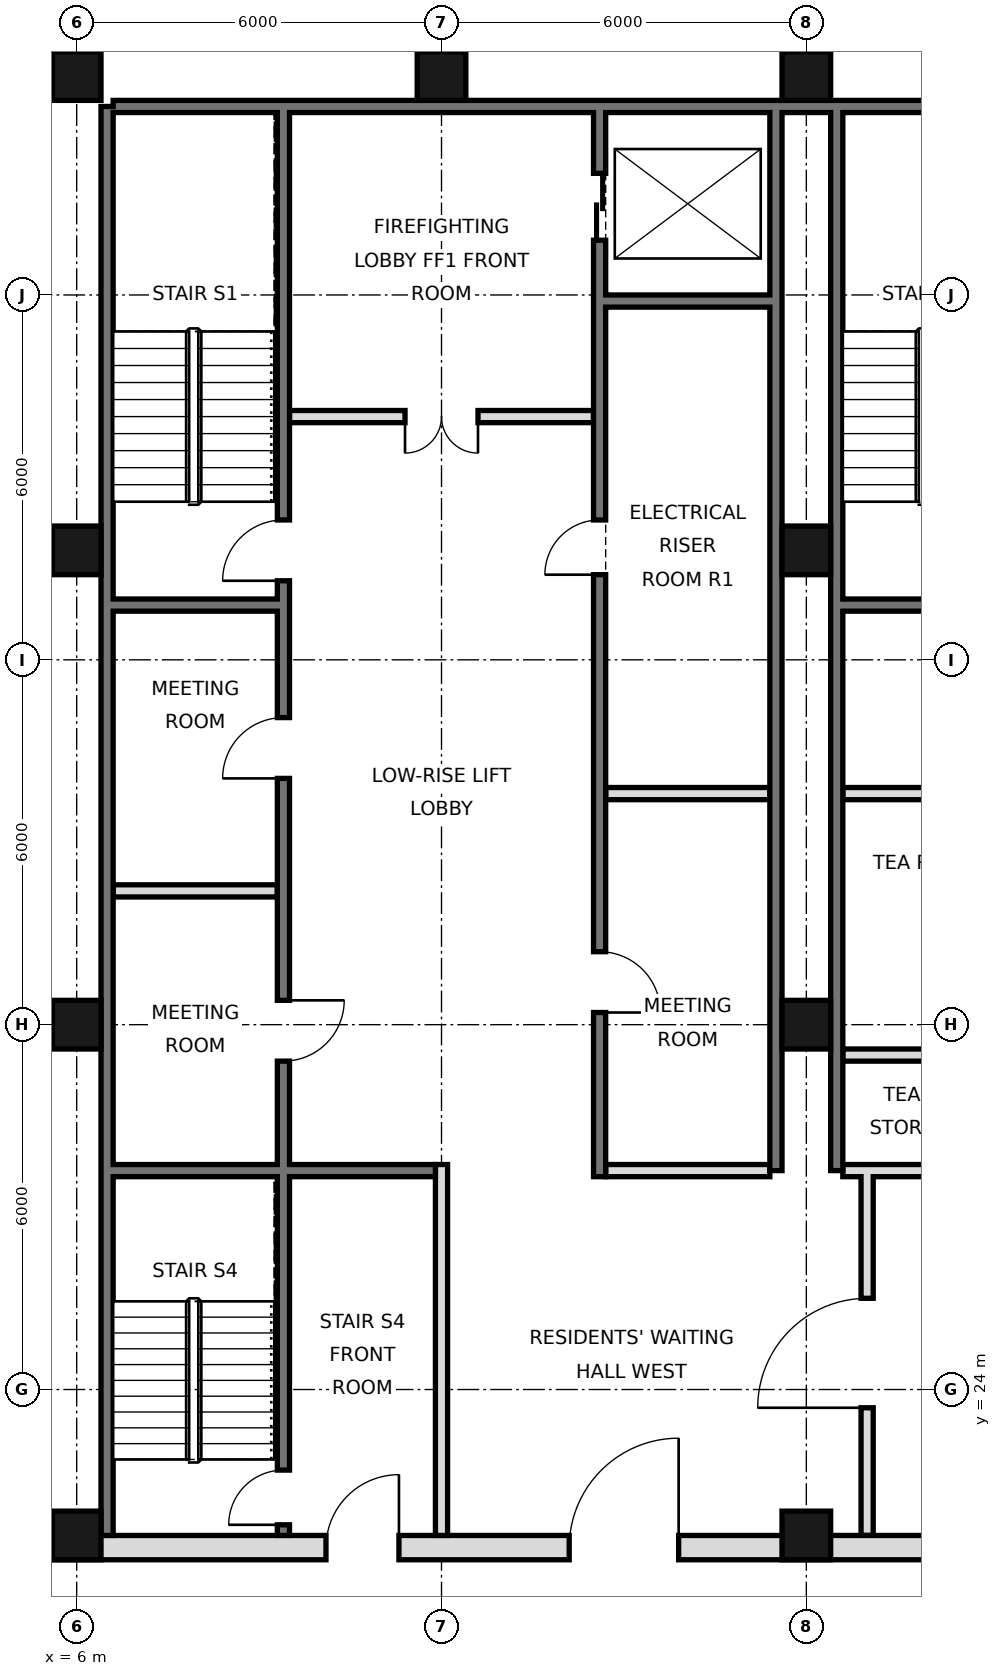
"""IFC4 building model, lengths in metres.
Left out: names, types, materials, properties, quantities, classifications, styles, units other than length and angle.
Written with IfcOpenShell. Run it as: python <this file> out.ifc"""

import sys

from ifc_helpers import new_model, si_unit, direction, frame, frame_2d, origin, origin_2d, place, context, subcontext, project, spatial, rectangle, hollow_rectangle, extrude, element, fill, save


model = new_model("IFC4")
c1 = context("Model", 3, precision=1e-05, world=origin(), true_north=direction((0.0, 1.0)))
c2 = subcontext(c1, "Body", "Model", "MODEL_VIEW")
j1 = project(units=[si_unit("LENGTHUNIT", "METRE"), si_unit("PLANEANGLEUNIT", "RADIAN")], contexts=[c1])
p1 = place(None, origin())
s1 = spatial("IfcSite", under=j1, at=p1, CompositionType="ELEMENT")
p2 = place(p1, origin())
s2 = spatial("IfcBuilding", under=s1, at=p2, CompositionType="ELEMENT")
p3 = place(p2, frame((0.0, 0.0, 270.2)))
s3 = spatial("IfcBuildingStorey", under=s2, at=p3, CompositionType="ELEMENT", Elevation=270.2)
for number, where, z_axis, x_axis in (
    (1, (6.0, 21.6, 0.0), (0.0, 0.0, 1.0), (1.0, 0.0, 0.0)),
    (2, (6.0, 30.0, 0.0), (0.0, 0.0, 1.0), (1.0, 0.0, 0.0)),
    (3, (6.0, 37.8, 0.0), (0.0, 0.0, 1.0), (1.0, 0.0, 0.0)),
    (4, (6.0, 45.6, 0.0), (0.0, 0.0, 1.0), (1.0, 0.0, 0.0)),
    (5, (12.0, 45.6, 0.0), (0.0, 0.0, 1.0), (1.0, 0.0, 0.0)),
    (6, (18.0, 21.6, 0.0), (0.0, 0.0, 1.0), (1.0, 0.0, 0.0)),
    (7, (18.0, 30.0, 0.0), (0.0, 0.0, 1.0), (1.0, 0.0, 0.0)),
    (8, (18.0, 37.8, 0.0), (0.0, 0.0, 1.0), (1.0, 0.0, 0.0)),
    (9, (18.0, 45.6, 0.0), (0.0, 0.0, 1.0), (1.0, 0.0, 0.0)),
):
    element("IfcColumn", number, at=place(p3, frame(where, z_axis=z_axis, x_axis=x_axis)), inside=s3, PredefinedType="COLUMN", context=c2, shape_type="SweptSolid", body=[
        extrude(hollow_rectangle(XDim=0.8, YDim=0.8, WallThickness=0.032, at=origin_2d()), origin(), (0.0, 0.0, 1.0), 3.6),
    ])
p4 = place(p3, frame((6.5, 21.6, 0.0), z_axis=(0.0, 0.0, 1.0), x_axis=(0.0, 1.0, 0.0)))
e10 = element("IfcWall", 10, at=p4, inside=s3, PredefinedType="SOLIDWALL", context=c2, shape_type="SweptSolid", body=[
    extrude(rectangle(XDim=23.5, YDim=0.2, at=frame_2d((11.75, 0.0))), origin(), (0.0, 0.0, 1.0), 3.42),
])
p5 = place(p3, frame((6.6, 45.1, 0.0), z_axis=(0.0, 0.0, 1.0), x_axis=(1.0, 0.0, 0.0)))
e11 = element("IfcWall", 11, at=p5, inside=s3, PredefinedType="SOLIDWALL", context=c2, shape_type="SweptSolid", body=[
    extrude(rectangle(XDim=34.8, YDim=0.2, at=frame_2d((17.4, 0.0))), origin(), (0.0, 0.0, 1.0), 3.42),
])
for number, where, z_axis, x_axis in (
    (12, (17.5, 27.6, 0.0), (0.0, 0.0, 1.0), (0.0, 1.0, 0.0)),
    (13, (18.5, 27.6, 0.0), (0.0, 0.0, 1.0), (0.0, 1.0, 0.0)),
):
    element("IfcWall", number, at=place(p3, frame(where, z_axis=z_axis, x_axis=x_axis)), inside=s3, PredefinedType="SOLIDWALL", context=c2, shape_type="SweptSolid", body=[
        extrude(rectangle(XDim=17.5, YDim=0.2, at=frame_2d((8.75, 0.0))), origin(), (0.0, 0.0, 1.0), 3.42),
    ])
p6 = place(p3, frame((5.6, 21.4, 0.0), z_axis=(0.0, 0.0, 1.0), x_axis=(1.0, 0.0, 0.0)))
e14 = element("IfcWall", 14, at=p6, inside=s3, PredefinedType="SOLIDWALL", context=c2, shape_type="SweptSolid", body=[
    extrude(rectangle(XDim=36.8, YDim=0.4, at=frame_2d((18.4, 0.0))), origin(), (0.0, 0.0, 1.0), 3.42),
])
p7 = place(p6, frame((8.5, 0.0, 0.0)))
e15 = element("IfcOpeningElement", 15, at=p7, cuts=e14, PredefinedType="OPENING", context=c2, shape_type="SweptSolid", body=[
    extrude(rectangle(XDim=1.8, YDim=2.1, at=frame_2d((0.9, 1.05))), frame((0.0, 0.21, 0.0), z_axis=(0.0, -1.0, 0.0), x_axis=(1.0, 0.0, 0.0)), (0.0, 0.0, 1.0), 0.42),
])
p8 = place(p6, frame((17.5, 0.0, 0.0)))
e16 = element("IfcOpeningElement", 16, at=p8, cuts=e14, PredefinedType="OPENING", context=c2, shape_type="SweptSolid", body=[
    extrude(rectangle(XDim=1.8, YDim=2.1, at=frame_2d((0.9, 1.05))), frame((0.0, 0.21, 0.0), z_axis=(0.0, -1.0, 0.0), x_axis=(1.0, 0.0, 0.0)), (0.0, 0.0, 1.0), 0.42),
])
p9 = place(p6, frame((26.5, 0.0, 0.0)))
e17 = element("IfcOpeningElement", 17, at=p9, cuts=e14, PredefinedType="OPENING", context=c2, shape_type="SweptSolid", body=[
    extrude(rectangle(XDim=1.8, YDim=2.1, at=frame_2d((0.9, 1.05))), frame((0.0, 0.21, 0.0), z_axis=(0.0, -1.0, 0.0), x_axis=(1.0, 0.0, 0.0)), (0.0, 0.0, 1.0), 0.42),
])
p10 = place(p6, frame((4.5, 0.0, 0.0)))
e18 = element("IfcOpeningElement", 18, at=p10, cuts=e14, PredefinedType="OPENING", context=c2, shape_type="SweptSolid", body=[
    extrude(rectangle(XDim=1.2, YDim=2.1, at=frame_2d((0.6, 1.05))), frame((0.0, 0.21, 0.0), z_axis=(0.0, -1.0, 0.0), x_axis=(1.0, 0.0, 0.0)), (0.0, 0.0, 1.0), 0.42),
])
p11 = place(p6, frame((31.1, 0.0, 0.0)))
e19 = element("IfcOpeningElement", 19, at=p11, cuts=e14, PredefinedType="OPENING", context=c2, shape_type="SweptSolid", body=[
    extrude(rectangle(XDim=1.2, YDim=2.1, at=frame_2d((0.6, 1.05))), frame((0.0, 0.21, 0.0), z_axis=(0.0, -1.0, 0.0), x_axis=(1.0, 0.0, 0.0)), (0.0, 0.0, 1.0), 0.42),
])
p12 = place(p3, frame((19.0, 21.6, 0.0), z_axis=(0.0, 0.0, 1.0), x_axis=(0.0, 1.0, 0.0)))
e20 = element("IfcWall", 20, at=p12, inside=s3, PredefinedType="PARTITIONING", context=c2, shape_type="SweptSolid", body=[
    extrude(rectangle(XDim=6.0, YDim=0.2, at=frame_2d((3.0, 0.0))), origin(), (0.0, 0.0, 1.0), 3.42),
])
p13 = place(p12, frame((2.1, 0.0, 0.0)))
e21 = element("IfcOpeningElement", 21, at=p13, cuts=e20, PredefinedType="OPENING", context=c2, shape_type="SweptSolid", body=[
    extrude(rectangle(XDim=1.8, YDim=2.1, at=frame_2d((0.9, 1.05))), frame((0.0, 0.11, 0.0), z_axis=(0.0, -1.0, 0.0), x_axis=(1.0, 0.0, 0.0)), (0.0, 0.0, 1.0), 0.22),
])
p14 = place(p3, frame((12.0, 21.6, 0.0), z_axis=(0.0, 0.0, 1.0), x_axis=(0.0, 1.0, 0.0)))
e22 = element("IfcWall", 22, at=p14, inside=s3, PredefinedType="PARTITIONING", context=c2, shape_type="SweptSolid", body=[
    extrude(rectangle(XDim=6.1, YDim=0.2, at=frame_2d((3.05, 0.0))), origin(), (0.0, 0.0, 1.0), 3.42),
])
p15 = place(p3, frame((14.6, 27.5, 0.0), z_axis=(0.0, 0.0, 1.0), x_axis=(0.0, 1.0, 0.0)))
e23 = element("IfcWall", 23, at=p15, inside=s3, PredefinedType="SOLIDWALL", context=c2, shape_type="SweptSolid", body=[
    extrude(rectangle(XDim=17.5, YDim=0.2, at=frame_2d((8.75, 0.0))), origin(), (0.0, 0.0, 1.0), 3.42),
])
p16 = place(p15, frame((15.4, 0.0, 0.0)))
e24 = element("IfcOpeningElement", 24, at=p16, cuts=e23, PredefinedType="OPENING", context=c2, shape_type="SweptSolid", body=[
    extrude(rectangle(XDim=1.1, YDim=2.1, at=frame_2d((0.55, 1.05))), frame((0.0, 0.11, 0.0), z_axis=(0.0, -1.0, 0.0), x_axis=(1.0, 0.0, 0.0)), (0.0, 0.0, 1.0), 0.22),
])
p17 = place(p15, frame((2.7, 0.0, 0.0)))
e25 = element("IfcOpeningElement", 25, at=p17, cuts=e23, PredefinedType="OPENING", context=c2, shape_type="SweptSolid", body=[
    extrude(rectangle(XDim=1.0, YDim=2.1, at=frame_2d((0.5, 1.05))), frame((0.0, 0.11, 0.0), z_axis=(0.0, -1.0, 0.0), x_axis=(1.0, 0.0, 0.0)), (0.0, 0.0, 1.0), 0.22),
])
p18 = place(p15, frame((9.9, 0.0, 0.0)))
e26 = element("IfcOpeningElement", 26, at=p18, cuts=e23, PredefinedType="OPENING", context=c2, shape_type="SweptSolid", body=[
    extrude(rectangle(XDim=0.9, YDim=2.1, at=frame_2d((0.45, 1.05))), frame((0.0, 0.11, 0.0), z_axis=(0.0, -1.0, 0.0), x_axis=(1.0, 0.0, 0.0)), (0.0, 0.0, 1.0), 0.22),
])
p19 = place(p3, frame((9.4, 21.6, 0.0), z_axis=(0.0, 0.0, 1.0), x_axis=(0.0, 1.0, 0.0)))
e27 = element("IfcWall", 27, at=p19, inside=s3, PredefinedType="SOLIDWALL", context=c2, shape_type="SweptSolid", body=[
    extrude(rectangle(XDim=23.4, YDim=0.2, at=frame_2d((11.7, 0.0))), origin(), (0.0, 0.0, 1.0), 3.42),
])
p20 = place(p19, frame((7.8, 0.0, 0.0)))
e28 = element("IfcOpeningElement", 28, at=p20, cuts=e27, PredefinedType="OPENING", context=c2, shape_type="SweptSolid", body=[
    extrude(rectangle(XDim=1.0, YDim=2.1, at=frame_2d((0.5, 1.05))), frame((0.0, 0.11, 0.0), z_axis=(0.0, -1.0, 0.0), x_axis=(1.0, 0.0, 0.0)), (0.0, 0.0, 1.0), 0.22),
])
p21 = place(p19, frame((12.45, 0.0, 0.0)))
e29 = element("IfcOpeningElement", 29, at=p21, cuts=e27, PredefinedType="OPENING", context=c2, shape_type="SweptSolid", body=[
    extrude(rectangle(XDim=1.0, YDim=2.1, at=frame_2d((0.5, 1.05))), frame((0.0, 0.11, 0.0), z_axis=(0.0, -1.0, 0.0), x_axis=(1.0, 0.0, 0.0)), (0.0, 0.0, 1.0), 0.22),
])
p22 = place(p19, frame((15.7, 0.0, 0.0)))
e30 = element("IfcOpeningElement", 30, at=p22, cuts=e27, PredefinedType="OPENING", context=c2, shape_type="SweptSolid", body=[
    extrude(rectangle(XDim=1.0, YDim=2.1, at=frame_2d((0.5, 1.05))), frame((0.0, 0.11, 0.0), z_axis=(0.0, -1.0, 0.0), x_axis=(1.0, 0.0, 0.0)), (0.0, 0.0, 1.0), 0.22),
])
p23 = place(p19, frame((0.175, 0.0, 0.0)))
e31 = element("IfcOpeningElement", 31, at=p23, cuts=e27, PredefinedType="OPENING", context=c2, shape_type="SweptSolid", body=[
    extrude(rectangle(XDim=0.9, YDim=2.1, at=frame_2d((0.45, 1.05))), frame((0.0, 0.11, 0.0), z_axis=(0.0, -1.0, 0.0), x_axis=(1.0, 0.0, 0.0)), (0.0, 0.0, 1.0), 0.22),
])
for number, where, z_axis, x_axis in (
    (32, (14.7, 27.6, 0.0), (0.0, 0.0, 1.0), (1.0, 0.0, 0.0)),
    (33, (18.6, 27.6, 0.0), (0.0, 0.0, 1.0), (1.0, 0.0, 0.0)),
):
    element("IfcWall", number, at=place(p3, frame(where, z_axis=z_axis, x_axis=x_axis)), inside=s3, PredefinedType="PARTITIONING", context=c2, shape_type="SweptSolid", body=[
        extrude(rectangle(XDim=2.7, YDim=0.2, at=frame_2d((1.35, 0.0))), origin(), (0.0, 0.0, 1.0), 3.42),
    ])
p24 = place(p3, frame((6.6, 27.6, 0.0), z_axis=(0.0, 0.0, 1.0), x_axis=(1.0, 0.0, 0.0)))
e34 = element("IfcWall", 34, at=p24, inside=s3, PredefinedType="SOLIDWALL", context=c2, shape_type="SweptSolid", body=[
    extrude(rectangle(XDim=5.3, YDim=0.2, at=frame_2d((2.65, 0.0))), origin(), (0.0, 0.0, 1.0), 3.42),
])
for number, where, z_axis, x_axis in (
    (35, (18.6, 29.5, 0.0), (0.0, 0.0, 1.0), (1.0, 0.0, 0.0)),
    (36, (6.6, 32.2, 0.0), (0.0, 0.0, 1.0), (1.0, 0.0, 0.0)),
):
    element("IfcWall", number, at=place(p3, frame(where, z_axis=z_axis, x_axis=x_axis)), inside=s3, PredefinedType="PARTITIONING", context=c2, shape_type="SweptSolid", body=[
        extrude(rectangle(XDim=2.7, YDim=0.2, at=frame_2d((1.35, 0.0))), origin(), (0.0, 0.0, 1.0), 3.42),
    ])
for number, where, z_axis, x_axis in (
    (37, (14.7, 33.8, 0.0), (0.0, 0.0, 1.0), (1.0, 0.0, 0.0)),
    (38, (18.6, 33.8, 0.0), (0.0, 0.0, 1.0), (1.0, 0.0, 0.0)),
    (39, (18.6, 36.9, 0.0), (0.0, 0.0, 1.0), (1.0, 0.0, 0.0)),
    (40, (6.6, 36.9, 0.0), (0.0, 0.0, 1.0), (1.0, 0.0, 0.0)),
):
    element("IfcWall", number, at=place(p3, frame(where, z_axis=z_axis, x_axis=x_axis)), inside=s3, PredefinedType="SOLIDWALL", context=c2, shape_type="SweptSolid", body=[
        extrude(rectangle(XDim=2.7, YDim=0.2, at=frame_2d((1.35, 0.0))), origin(), (0.0, 0.0, 1.0), 3.42),
    ])
p25 = place(p3, frame((9.5, 40.0, 0.0), z_axis=(0.0, 0.0, 1.0), x_axis=(1.0, 0.0, 0.0)))
e41 = element("IfcWall", 41, at=p25, inside=s3, PredefinedType="PARTITIONING", context=c2, shape_type="SweptSolid", body=[
    extrude(rectangle(XDim=5.0, YDim=0.2, at=frame_2d((2.5, 0.0))), origin(), (0.0, 0.0, 1.0), 3.42),
])
p26 = place(p25, frame((1.9, 0.0, 0.0)))
e42 = element("IfcOpeningElement", 42, at=p26, cuts=e41, PredefinedType="OPENING", context=c2, shape_type="SweptSolid", body=[
    extrude(rectangle(XDim=1.2, YDim=2.1, at=frame_2d((0.6, 1.05))), frame((0.0, 0.11, 0.0), z_axis=(0.0, -1.0, 0.0), x_axis=(1.0, 0.0, 0.0)), (0.0, 0.0, 1.0), 0.22),
])
p27 = place(p3, frame((14.7, 41.9, 0.0), z_axis=(0.0, 0.0, 1.0), x_axis=(1.0, 0.0, 0.0)))
e43 = element("IfcWall", 43, at=p27, inside=s3, PredefinedType="SOLIDWALL", context=c2, shape_type="SweptSolid", body=[
    extrude(rectangle(XDim=2.7, YDim=0.2, at=frame_2d((1.35, 0.0))), origin(), (0.0, 0.0, 1.0), 3.42),
])
p28 = place(p7, frame((1.8, 0.0, 0.0), z_axis=(0.0, 0.0, 1.0), x_axis=(-1.0, 0.0, 0.0)))
e44 = element("IfcDoor", 44, at=p28, inside=s3, OperationType="SINGLE_SWING_LEFT", PredefinedType="DOOR", context=c2, shape_type="SweptSolid", body=[
    extrude(rectangle(XDim=1.8, YDim=2.1, at=frame_2d((0.9, 1.05))), frame((0.0, 0.025, 0.0), z_axis=(0.0, -1.0, 0.0), x_axis=(1.0, 0.0, 0.0)), (0.0, 0.0, 1.0), 0.05),
])
fill(e15, e44)
p29 = place(p13, origin())
e45 = element("IfcDoor", 45, at=p29, inside=s3, OperationType="SINGLE_SWING_LEFT", PredefinedType="DOOR", context=c2, shape_type="SweptSolid", body=[
    extrude(rectangle(XDim=1.8, YDim=2.1, at=frame_2d((0.9, 1.05))), frame((0.0, 0.025, 0.0), z_axis=(0.0, -1.0, 0.0), x_axis=(1.0, 0.0, 0.0)), (0.0, 0.0, 1.0), 0.05),
])
fill(e21, e45)
p30 = place(p10, frame((1.2, 0.0, 0.0), z_axis=(0.0, 0.0, 1.0), x_axis=(-1.0, 0.0, 0.0)))
e46 = element("IfcDoor", 46, at=p30, inside=s3, OperationType="SINGLE_SWING_LEFT", PredefinedType="DOOR", context=c2, shape_type="SweptSolid", body=[
    extrude(rectangle(XDim=1.2, YDim=2.1, at=frame_2d((0.6, 1.05))), frame((0.0, 0.025, 0.0), z_axis=(0.0, -1.0, 0.0), x_axis=(1.0, 0.0, 0.0)), (0.0, 0.0, 1.0), 0.05),
])
fill(e18, e46)
p31 = place(p26, frame((1.2, 0.0, 0.0), z_axis=(0.0, 0.0, 1.0), x_axis=(-1.0, 0.0, 0.0)))
e47 = element("IfcDoor", 47, at=p31, inside=s3, OperationType="DOUBLE_DOOR_SINGLE_SWING", PredefinedType="DOOR", context=c2, shape_type="SweptSolid", body=[
    extrude(rectangle(XDim=1.2, YDim=2.1, at=frame_2d((0.6, 1.05))), frame((0.0, 0.025, 0.0), z_axis=(0.0, -1.0, 0.0), x_axis=(1.0, 0.0, 0.0)), (0.0, 0.0, 1.0), 0.05),
])
fill(e42, e47)
p32 = place(p16, origin())
e48 = element("IfcDoor", 48, at=p32, inside=s3, OperationType="DOUBLE_DOOR_SLIDING", PredefinedType="DOOR", context=c2, shape_type="SweptSolid", body=[
    extrude(rectangle(XDim=1.1, YDim=2.1, at=frame_2d((0.55, 1.05))), frame((0.0, 0.025, 0.0), z_axis=(0.0, -1.0, 0.0), x_axis=(1.0, 0.0, 0.0)), (0.0, 0.0, 1.0), 0.05),
])
fill(e24, e48)
p33 = place(p17, frame((1.0, 0.0, 0.0), z_axis=(0.0, 0.0, 1.0), x_axis=(-1.0, 0.0, 0.0)))
e49 = element("IfcDoor", 49, at=p33, inside=s3, OperationType="SINGLE_SWING_RIGHT", PredefinedType="DOOR", context=c2, shape_type="SweptSolid", body=[
    extrude(rectangle(XDim=1.0, YDim=2.1, at=frame_2d((0.5, 1.05))), frame((0.0, 0.025, 0.0), z_axis=(0.0, -1.0, 0.0), x_axis=(1.0, 0.0, 0.0)), (0.0, 0.0, 1.0), 0.05),
])
fill(e25, e49)
p34 = place(p20, origin())
e50 = element("IfcDoor", 50, at=p34, inside=s3, OperationType="SINGLE_SWING_RIGHT", PredefinedType="DOOR", context=c2, shape_type="SweptSolid", body=[
    extrude(rectangle(XDim=1.0, YDim=2.1, at=frame_2d((0.5, 1.05))), frame((0.0, 0.025, 0.0), z_axis=(0.0, -1.0, 0.0), x_axis=(1.0, 0.0, 0.0)), (0.0, 0.0, 1.0), 0.05),
])
fill(e28, e50)
p35 = place(p21, origin())
e51 = element("IfcDoor", 51, at=p35, inside=s3, OperationType="SINGLE_SWING_LEFT", PredefinedType="DOOR", context=c2, shape_type="SweptSolid", body=[
    extrude(rectangle(XDim=1.0, YDim=2.1, at=frame_2d((0.5, 1.05))), frame((0.0, 0.025, 0.0), z_axis=(0.0, -1.0, 0.0), x_axis=(1.0, 0.0, 0.0)), (0.0, 0.0, 1.0), 0.05),
])
fill(e29, e51)
p36 = place(p22, origin())
e52 = element("IfcDoor", 52, at=p36, inside=s3, OperationType="SINGLE_SWING_LEFT", PredefinedType="DOOR", context=c2, shape_type="SweptSolid", body=[
    extrude(rectangle(XDim=1.0, YDim=2.1, at=frame_2d((0.5, 1.05))), frame((0.0, 0.025, 0.0), z_axis=(0.0, -1.0, 0.0), x_axis=(1.0, 0.0, 0.0)), (0.0, 0.0, 1.0), 0.05),
])
fill(e30, e52)
p37 = place(p23, origin())
e53 = element("IfcDoor", 53, at=p37, inside=s3, OperationType="SINGLE_SWING_LEFT", PredefinedType="DOOR", context=c2, shape_type="SweptSolid", body=[
    extrude(rectangle(XDim=0.9, YDim=2.1, at=frame_2d((0.45, 1.05))), frame((0.0, 0.025, 0.0), z_axis=(0.0, -1.0, 0.0), x_axis=(1.0, 0.0, 0.0)), (0.0, 0.0, 1.0), 0.05),
])
fill(e31, e53)
p38 = place(p18, origin())
e54 = element("IfcDoor", 54, at=p38, inside=s3, OperationType="SINGLE_SWING_LEFT", PredefinedType="DOOR", context=c2, shape_type="SweptSolid", body=[
    extrude(rectangle(XDim=0.9, YDim=2.1, at=frame_2d((0.45, 1.05))), frame((0.0, 0.025, 0.0), z_axis=(0.0, -1.0, 0.0), x_axis=(1.0, 0.0, 0.0)), (0.0, 0.0, 1.0), 0.05),
])
fill(e26, e54)
save(model, sys.argv[1])
